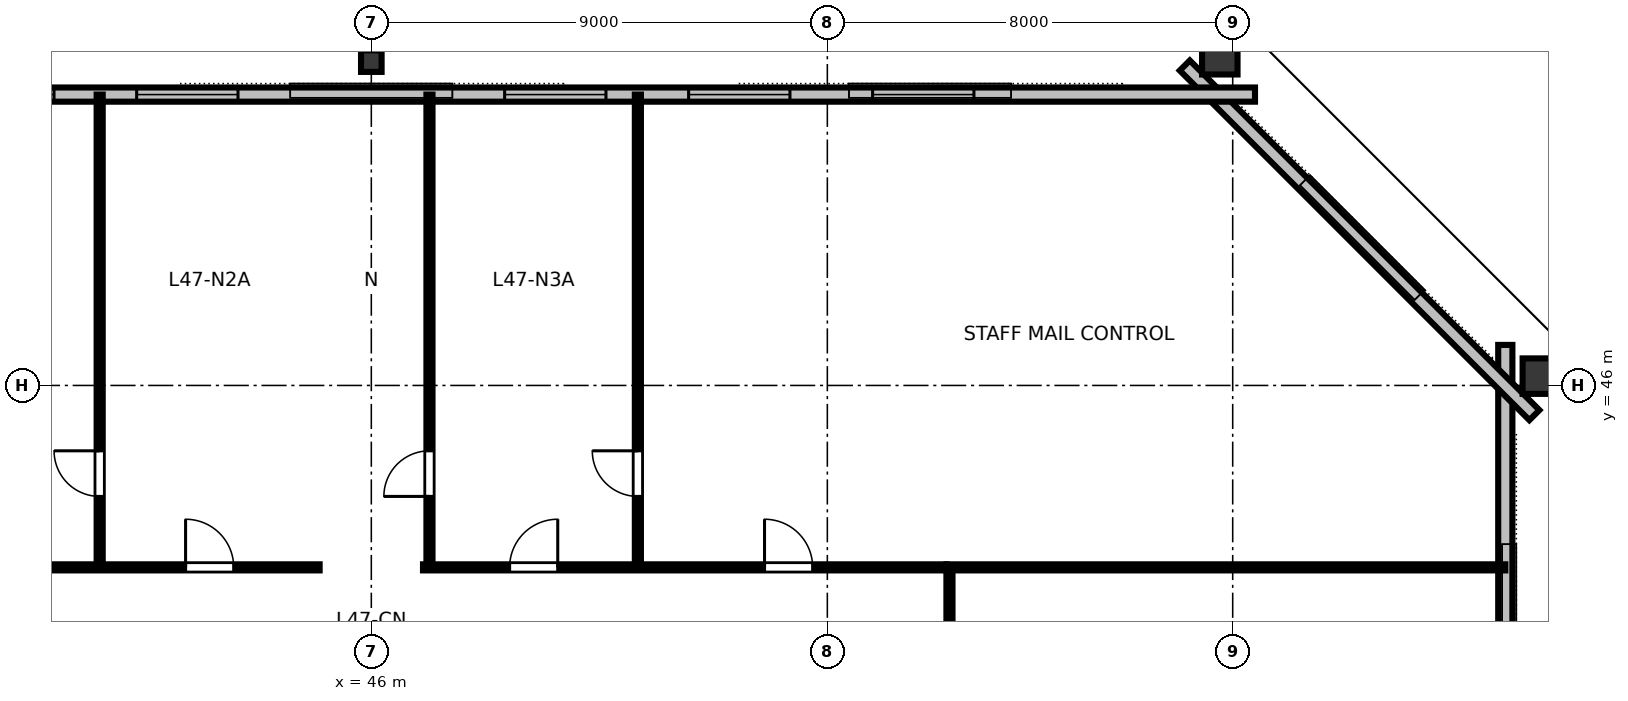
"""IFC4 building model, lengths in metres.
Left out: names, types, materials, properties, quantities, classifications, styles, units other than length and angle.
Written with IfcOpenShell. Run it as: python <this file> out.ifc"""

import sys

from ifc_helpers import new_model, si_unit, direction, frame, frame_2d, origin, origin_2d, place, context, subcontext, project, spatial, rectangle, hollow_rectangle, i_section, extrude, element, fill, save


model = new_model("IFC4")
c1 = context("Model", 3, precision=1e-05, world=origin(), true_north=direction((0.0, 1.0)))
c2 = subcontext(c1, "Body", "Model", "MODEL_VIEW")
j1 = project(units=[si_unit("LENGTHUNIT", "METRE"), si_unit("PLANEANGLEUNIT", "RADIAN")], contexts=[c1])
p1 = place(None, origin())
s1 = spatial("IfcSite", under=j1, at=p1, CompositionType="ELEMENT")
p2 = place(p1, origin())
s2 = spatial("IfcBuilding", under=s1, at=p2, CompositionType="ELEMENT")
p3 = place(p2, frame((0.0, 0.0, 180.6)))
s3 = spatial("IfcBuildingStorey", under=s2, at=p3, CompositionType="ELEMENT", Elevation=180.6)
for number, where, z_axis, x_axis in (
    (1, (69.146, 46.184, 0.0), (0.0, 0.0, 1.0), (0.0, 1.0, 0.0)),
    (2, (62.745, 52.562, 0.0), (0.0, 0.0, 1.0), (1.0, 0.0, 0.0)),
):
    element("IfcColumn", number, at=place(p3, frame(where, z_axis=z_axis, x_axis=x_axis)), inside=s3, PredefinedType="COLUMN", context=c2, shape_type="SweptSolid", body=[
        extrude(hollow_rectangle(XDim=0.7, YDim=0.85, WallThickness=0.04, at=origin_2d()), origin(), (0.0, 0.0, 1.0), 3.358),
    ])
p4 = place(p3, frame((46.0, 52.4, 0.0), z_axis=(0.0, 0.0, 1.0), x_axis=(1.0, 0.0, 0.0)))
e3 = element("IfcColumn", 3, at=p4, inside=s3, PredefinedType="COLUMN", context=c2, shape_type="SweptSolid", body=[
    extrude(i_section(OverallWidth=0.406, OverallDepth=0.425, WebThickness=0.033, FlangeThickness=0.052, FilletRadius=0.025, at=origin_2d()), origin(), (0.0, 0.0, 1.0), 3.358),
])
p5 = place(p3, frame((68.38, 17.2, 0.0), z_axis=(0.0, 0.0, 1.0), x_axis=(0.0, 1.0, 0.0)))
e4 = element("IfcWall", 4, at=p5, inside=s3, PredefinedType="STANDARD", context=c2, shape_type="SweptSolid", body=[
    extrude(rectangle(XDim=29.6, YDim=0.28, at=frame_2d((14.8, 0.0))), origin(), (0.0, 0.0, 1.0), 3.36),
])
p6 = place(p5, frame((5.971, 0.0, 0.8)))
e5 = element("IfcOpeningElement", 5, at=p6, cuts=e4, PredefinedType="OPENING", context=c2, shape_type="SweptSolid", body=[
    extrude(rectangle(XDim=2.0, YDim=1.95, at=frame_2d((1.0, 0.975))), frame((0.0, 0.15, 0.0), z_axis=(0.0, -1.0, 0.0), x_axis=(1.0, 0.0, 0.0)), (0.0, 0.0, 1.0), 0.3),
])
p7 = place(p5, frame((9.886, 0.0, 0.8)))
e6 = element("IfcOpeningElement", 6, at=p7, cuts=e4, PredefinedType="OPENING", context=c2, shape_type="SweptSolid", body=[
    extrude(rectangle(XDim=2.0, YDim=1.95, at=frame_2d((1.0, 0.975))), frame((0.0, 0.15, 0.0), z_axis=(0.0, -1.0, 0.0), x_axis=(1.0, 0.0, 0.0)), (0.0, 0.0, 1.0), 0.3),
])
p8 = place(p5, frame((17.714, 0.0, 0.8)))
e7 = element("IfcOpeningElement", 7, at=p8, cuts=e4, PredefinedType="OPENING", context=c2, shape_type="SweptSolid", body=[
    extrude(rectangle(XDim=2.0, YDim=1.95, at=frame_2d((1.0, 0.975))), frame((0.0, 0.15, 0.0), z_axis=(0.0, -1.0, 0.0), x_axis=(1.0, 0.0, 0.0)), (0.0, 0.0, 1.0), 0.3),
])
p9 = place(p5, frame((21.629, 0.0, 0.8)))
e8 = element("IfcOpeningElement", 8, at=p9, cuts=e4, PredefinedType="OPENING", context=c2, shape_type="SweptSolid", body=[
    extrude(rectangle(XDim=2.0, YDim=1.95, at=frame_2d((1.0, 0.975))), frame((0.0, 0.15, 0.0), z_axis=(0.0, -1.0, 0.0), x_axis=(1.0, 0.0, 0.0)), (0.0, 0.0, 1.0), 0.3),
])
p10 = place(p3, frame((68.954, 45.415, 0.0), z_axis=(0.0, 0.0, 1.0), x_axis=(-0.707106781187, 0.707106781187, 0.0)))
e9 = element("IfcWall", 9, at=p10, inside=s3, PredefinedType="STANDARD", context=c2, shape_type="SweptSolid", body=[
    extrude(rectangle(XDim=9.757, YDim=0.28, at=frame_2d((4.879, 0.0))), origin(), (0.0, 0.0, 1.0), 3.36),
])
p11 = place(p3, frame((63.44, 51.74, 0.0), z_axis=(0.0, 0.0, 1.0), x_axis=(-1.0, 0.0, 0.0)))
e10 = element("IfcWall", 10, at=p11, inside=s3, PredefinedType="STANDARD", context=c2, shape_type="SweptSolid", body=[
    extrude(rectangle(XDim=34.88, YDim=0.28, at=frame_2d((17.44, 0.0))), origin(), (0.0, 0.0, 1.0), 3.36),
])
p12 = place(p11, frame((5.547, 0.0, 0.8)))
e11 = element("IfcOpeningElement", 11, at=p12, cuts=e10, PredefinedType="OPENING", context=c2, shape_type="SweptSolid", body=[
    extrude(rectangle(XDim=2.0, YDim=1.95, at=frame_2d((1.0, 0.975))), frame((0.0, 0.15, 0.0), z_axis=(0.0, -1.0, 0.0), x_axis=(1.0, 0.0, 0.0)), (0.0, 0.0, 1.0), 0.3),
])
p13 = place(p11, frame((9.178, 0.0, 0.8)))
e12 = element("IfcOpeningElement", 12, at=p13, cuts=e10, PredefinedType="OPENING", context=c2, shape_type="SweptSolid", body=[
    extrude(rectangle(XDim=2.0, YDim=1.95, at=frame_2d((1.0, 0.975))), frame((0.0, 0.15, 0.0), z_axis=(0.0, -1.0, 0.0), x_axis=(1.0, 0.0, 0.0)), (0.0, 0.0, 1.0), 0.3),
])
p14 = place(p11, frame((12.809, 0.0, 0.8)))
e13 = element("IfcOpeningElement", 13, at=p14, cuts=e10, PredefinedType="OPENING", context=c2, shape_type="SweptSolid", body=[
    extrude(rectangle(XDim=2.0, YDim=1.95, at=frame_2d((1.0, 0.975))), frame((0.0, 0.15, 0.0), z_axis=(0.0, -1.0, 0.0), x_axis=(1.0, 0.0, 0.0)), (0.0, 0.0, 1.0), 0.3),
])
p15 = place(p11, frame((20.071, 0.0, 0.8)))
e14 = element("IfcOpeningElement", 14, at=p15, cuts=e10, PredefinedType="OPENING", context=c2, shape_type="SweptSolid", body=[
    extrude(rectangle(XDim=2.0, YDim=1.95, at=frame_2d((1.0, 0.975))), frame((0.0, 0.15, 0.0), z_axis=(0.0, -1.0, 0.0), x_axis=(1.0, 0.0, 0.0)), (0.0, 0.0, 1.0), 0.3),
])
p16 = place(p11, frame((23.702, 0.0, 0.8)))
e15 = element("IfcOpeningElement", 15, at=p16, cuts=e10, PredefinedType="OPENING", context=c2, shape_type="SweptSolid", body=[
    extrude(rectangle(XDim=2.0, YDim=1.95, at=frame_2d((1.0, 0.975))), frame((0.0, 0.15, 0.0), z_axis=(0.0, -1.0, 0.0), x_axis=(1.0, 0.0, 0.0)), (0.0, 0.0, 1.0), 0.3),
])
p17 = place(p11, frame((27.333, 0.0, 0.8)))
e16 = element("IfcOpeningElement", 16, at=p17, cuts=e10, PredefinedType="OPENING", context=c2, shape_type="SweptSolid", body=[
    extrude(rectangle(XDim=2.0, YDim=1.95, at=frame_2d((1.0, 0.975))), frame((0.0, 0.15, 0.0), z_axis=(0.0, -1.0, 0.0), x_axis=(1.0, 0.0, 0.0)), (0.0, 0.0, 1.0), 0.3),
])
p18 = place(p3, frame((40.639, 42.41, 0.0), z_axis=(0.0, 0.0, 1.0), x_axis=(0.0, 1.0, 0.0)))
e17 = element("IfcWall", 17, at=p18, inside=s3, PredefinedType="PARTITIONING", context=c2, shape_type="SweptSolid", body=[
    extrude(rectangle(XDim=9.33, YDim=0.12, at=frame_2d((4.665, 0.0))), origin(), (0.0, 0.0, 1.0), 2.64),
])
p19 = place(p18, frame((1.4, 0.0, 0.0)))
e18 = element("IfcOpeningElement", 18, at=p19, cuts=e17, PredefinedType="OPENING", context=c2, shape_type="SweptSolid", body=[
    extrude(rectangle(XDim=0.9, YDim=2.15, at=frame_2d((0.45, 1.075))), frame((0.0, 0.07, 0.0), z_axis=(0.0, -1.0, 0.0), x_axis=(1.0, 0.0, 0.0)), (0.0, 0.0, 1.0), 0.14),
])
p20 = place(p3, frame((47.148, 42.41, 0.0), z_axis=(0.0, 0.0, 1.0), x_axis=(0.0, 1.0, 0.0)))
e19 = element("IfcWall", 19, at=p20, inside=s3, PredefinedType="PARTITIONING", context=c2, shape_type="SweptSolid", body=[
    extrude(rectangle(XDim=9.33, YDim=0.12, at=frame_2d((4.665, 0.0))), origin(), (0.0, 0.0, 1.0), 2.64),
])
p21 = place(p20, frame((1.4, 0.0, 0.0)))
e20 = element("IfcOpeningElement", 20, at=p21, cuts=e19, PredefinedType="OPENING", context=c2, shape_type="SweptSolid", body=[
    extrude(rectangle(XDim=0.9, YDim=2.15, at=frame_2d((0.45, 1.075))), frame((0.0, 0.07, 0.0), z_axis=(0.0, -1.0, 0.0), x_axis=(1.0, 0.0, 0.0)), (0.0, 0.0, 1.0), 0.14),
])
p22 = place(p3, frame((51.261, 42.41, 0.0), z_axis=(0.0, 0.0, 1.0), x_axis=(0.0, 1.0, 0.0)))
e21 = element("IfcWall", 21, at=p22, inside=s3, PredefinedType="PARTITIONING", context=c2, shape_type="SweptSolid", body=[
    extrude(rectangle(XDim=9.33, YDim=0.12, at=frame_2d((4.665, 0.0))), origin(), (0.0, 0.0, 1.0), 2.64),
])
p23 = place(p22, frame((1.4, 0.0, 0.0)))
e22 = element("IfcOpeningElement", 22, at=p23, cuts=e21, PredefinedType="OPENING", context=c2, shape_type="SweptSolid", body=[
    extrude(rectangle(XDim=0.9, YDim=2.15, at=frame_2d((0.45, 1.075))), frame((0.0, 0.07, 0.0), z_axis=(0.0, -1.0, 0.0), x_axis=(1.0, 0.0, 0.0)), (0.0, 0.0, 1.0), 0.14),
])
p24 = place(p3, frame((34.65, 42.41, 0.0), z_axis=(0.0, 0.0, 1.0), x_axis=(1.0, 0.0, 0.0)))
e23 = element("IfcWall", 23, at=p24, inside=s3, PredefinedType="PARTITIONING", context=c2, shape_type="SweptSolid", body=[
    extrude(rectangle(XDim=10.33, YDim=0.12, at=frame_2d((5.165, 0.0))), origin(), (0.0, 0.0, 1.0), 2.64),
])
p25 = place(p24, frame((2.59, 0.0, 0.0)))
e24 = element("IfcOpeningElement", 24, at=p25, cuts=e23, PredefinedType="OPENING", context=c2, shape_type="SweptSolid", body=[
    extrude(rectangle(XDim=0.95, YDim=2.15, at=frame_2d((0.475, 1.075))), frame((0.0, 0.07, 0.0), z_axis=(0.0, -1.0, 0.0), x_axis=(1.0, 0.0, 0.0)), (0.0, 0.0, 1.0), 0.14),
])
p26 = place(p24, frame((7.685, 0.0, 0.0)))
e25 = element("IfcOpeningElement", 25, at=p26, cuts=e23, PredefinedType="OPENING", context=c2, shape_type="SweptSolid", body=[
    extrude(rectangle(XDim=0.95, YDim=2.15, at=frame_2d((0.475, 1.075))), frame((0.0, 0.07, 0.0), z_axis=(0.0, -1.0, 0.0), x_axis=(1.0, 0.0, 0.0)), (0.0, 0.0, 1.0), 0.14),
])
p27 = place(p3, frame((47.02, 42.41, 0.0), z_axis=(0.0, 0.0, 1.0), x_axis=(1.0, 0.0, 0.0)))
e26 = element("IfcWall", 26, at=p27, inside=s3, PredefinedType="PARTITIONING", context=c2, shape_type="SweptSolid", body=[
    extrude(rectangle(XDim=10.33, YDim=0.12, at=frame_2d((5.165, 0.0))), origin(), (0.0, 0.0, 1.0), 2.64),
])
p28 = place(p27, frame((1.709, 0.0, 0.0)))
e27 = element("IfcOpeningElement", 27, at=p28, cuts=e26, PredefinedType="OPENING", context=c2, shape_type="SweptSolid", body=[
    extrude(rectangle(XDim=0.95, YDim=2.15, at=frame_2d((0.475, 1.075))), frame((0.0, 0.07, 0.0), z_axis=(0.0, -1.0, 0.0), x_axis=(1.0, 0.0, 0.0)), (0.0, 0.0, 1.0), 0.14),
])
p29 = place(p27, frame((6.74, 0.0, 0.0)))
e28 = element("IfcOpeningElement", 28, at=p29, cuts=e26, PredefinedType="OPENING", context=c2, shape_type="SweptSolid", body=[
    extrude(rectangle(XDim=0.95, YDim=2.15, at=frame_2d((0.475, 1.075))), frame((0.0, 0.07, 0.0), z_axis=(0.0, -1.0, 0.0), x_axis=(1.0, 0.0, 0.0)), (0.0, 0.0, 1.0), 0.14),
])
p30 = place(p3, frame((57.41, 21.65, 0.0), z_axis=(0.0, 0.0, 1.0), x_axis=(0.0, 1.0, 0.0)))
e29 = element("IfcWall", 29, at=p30, inside=s3, PredefinedType="PARTITIONING", context=c2, shape_type="SweptSolid", body=[
    extrude(rectangle(XDim=20.7, YDim=0.12, at=frame_2d((10.35, 0.0))), origin(), (0.0, 0.0, 1.0), 2.64),
])
p31 = place(p30, frame((6.073, 0.0, 0.0)))
e30 = element("IfcOpeningElement", 30, at=p31, cuts=e29, PredefinedType="OPENING", context=c2, shape_type="SweptSolid", body=[
    extrude(rectangle(XDim=0.95, YDim=2.15, at=frame_2d((0.475, 1.075))), frame((0.0, 0.07, 0.0), z_axis=(0.0, -1.0, 0.0), x_axis=(1.0, 0.0, 0.0)), (0.0, 0.0, 1.0), 0.14),
])
p32 = place(p30, frame((16.223, 0.0, 0.0)))
e31 = element("IfcOpeningElement", 31, at=p32, cuts=e29, PredefinedType="OPENING", context=c2, shape_type="SweptSolid", body=[
    extrude(rectangle(XDim=0.95, YDim=2.15, at=frame_2d((0.475, 1.075))), frame((0.0, 0.07, 0.0), z_axis=(0.0, -1.0, 0.0), x_axis=(1.0, 0.0, 0.0)), (0.0, 0.0, 1.0), 0.14),
])
p33 = place(p3, frame((57.35, 42.41, 0.0), z_axis=(0.0, 0.0, 1.0), x_axis=(1.0, 0.0, 0.0)))
e32 = element("IfcWall", 32, at=p33, inside=s3, PredefinedType="PARTITIONING", context=c2, shape_type="SweptSolid", body=[
    extrude(rectangle(XDim=11.03, YDim=0.12, at=frame_2d((5.515, 0.0))), origin(), (0.0, 0.0, 1.0), 2.64),
])
p34 = place(p12, origin())
e33 = element("IfcWindow", 33, at=p34, inside=s3, PartitioningType="SINGLE_PANEL", PredefinedType="WINDOW", context=c2, shape_type="SweptSolid", body=[
    extrude(rectangle(XDim=2.0, YDim=1.95, at=frame_2d((1.0, 0.975))), frame((0.0, 0.03, 0.0), z_axis=(0.0, -1.0, 0.0), x_axis=(1.0, 0.0, 0.0)), (0.0, 0.0, 1.0), 0.06),
])
fill(e11, e33)
p35 = place(p13, origin())
e34 = element("IfcWindow", 34, at=p35, inside=s3, PartitioningType="SINGLE_PANEL", PredefinedType="WINDOW", context=c2, shape_type="SweptSolid", body=[
    extrude(rectangle(XDim=2.0, YDim=1.95, at=frame_2d((1.0, 0.975))), frame((0.0, 0.03, 0.0), z_axis=(0.0, -1.0, 0.0), x_axis=(1.0, 0.0, 0.0)), (0.0, 0.0, 1.0), 0.06),
])
fill(e12, e34)
p36 = place(p14, origin())
e35 = element("IfcWindow", 35, at=p36, inside=s3, PartitioningType="SINGLE_PANEL", PredefinedType="WINDOW", context=c2, shape_type="SweptSolid", body=[
    extrude(rectangle(XDim=2.0, YDim=1.95, at=frame_2d((1.0, 0.975))), frame((0.0, 0.03, 0.0), z_axis=(0.0, -1.0, 0.0), x_axis=(1.0, 0.0, 0.0)), (0.0, 0.0, 1.0), 0.06),
])
fill(e13, e35)
p37 = place(p15, origin())
e36 = element("IfcWindow", 36, at=p37, inside=s3, PartitioningType="SINGLE_PANEL", PredefinedType="WINDOW", context=c2, shape_type="SweptSolid", body=[
    extrude(rectangle(XDim=2.0, YDim=1.95, at=frame_2d((1.0, 0.975))), frame((0.0, 0.03, 0.0), z_axis=(0.0, -1.0, 0.0), x_axis=(1.0, 0.0, 0.0)), (0.0, 0.0, 1.0), 0.06),
])
fill(e14, e36)
p38 = place(p16, origin())
e37 = element("IfcWindow", 37, at=p38, inside=s3, PartitioningType="SINGLE_PANEL", PredefinedType="WINDOW", context=c2, shape_type="SweptSolid", body=[
    extrude(rectangle(XDim=2.0, YDim=1.95, at=frame_2d((1.0, 0.975))), frame((0.0, 0.03, 0.0), z_axis=(0.0, -1.0, 0.0), x_axis=(1.0, 0.0, 0.0)), (0.0, 0.0, 1.0), 0.06),
])
fill(e15, e37)
p39 = place(p19, origin())
e38 = element("IfcDoor", 38, at=p39, inside=s3, OperationType="SINGLE_SWING_RIGHT", PredefinedType="DOOR", context=c2, shape_type="SweptSolid", body=[
    extrude(rectangle(XDim=0.9, YDim=2.15, at=frame_2d((0.45, 1.075))), frame((0.0, 0.025, 0.0), z_axis=(0.0, -1.0, 0.0), x_axis=(1.0, 0.0, 0.0)), (0.0, 0.0, 1.0), 0.05),
])
fill(e18, e38)
p40 = place(p21, origin())
e39 = element("IfcDoor", 39, at=p40, inside=s3, OperationType="SINGLE_SWING_LEFT", PredefinedType="DOOR", context=c2, shape_type="SweptSolid", body=[
    extrude(rectangle(XDim=0.9, YDim=2.15, at=frame_2d((0.45, 1.075))), frame((0.0, 0.025, 0.0), z_axis=(0.0, -1.0, 0.0), x_axis=(1.0, 0.0, 0.0)), (0.0, 0.0, 1.0), 0.05),
])
fill(e20, e39)
p41 = place(p23, origin())
e40 = element("IfcDoor", 40, at=p41, inside=s3, OperationType="SINGLE_SWING_RIGHT", PredefinedType="DOOR", context=c2, shape_type="SweptSolid", body=[
    extrude(rectangle(XDim=0.9, YDim=2.15, at=frame_2d((0.45, 1.075))), frame((0.0, 0.025, 0.0), z_axis=(0.0, -1.0, 0.0), x_axis=(1.0, 0.0, 0.0)), (0.0, 0.0, 1.0), 0.05),
])
fill(e22, e40)
p42 = place(p26, origin())
e41 = element("IfcDoor", 41, at=p42, inside=s3, OperationType="SINGLE_SWING_LEFT", PredefinedType="DOOR", context=c2, shape_type="SweptSolid", body=[
    extrude(rectangle(XDim=0.95, YDim=2.15, at=frame_2d((0.475, 1.075))), frame((0.0, 0.025, 0.0), z_axis=(0.0, -1.0, 0.0), x_axis=(1.0, 0.0, 0.0)), (0.0, 0.0, 1.0), 0.05),
])
fill(e25, e41)
p43 = place(p28, origin())
e42 = element("IfcDoor", 42, at=p43, inside=s3, OperationType="SINGLE_SWING_RIGHT", PredefinedType="DOOR", context=c2, shape_type="SweptSolid", body=[
    extrude(rectangle(XDim=0.95, YDim=2.15, at=frame_2d((0.475, 1.075))), frame((0.0, 0.025, 0.0), z_axis=(0.0, -1.0, 0.0), x_axis=(1.0, 0.0, 0.0)), (0.0, 0.0, 1.0), 0.05),
])
fill(e27, e42)
p44 = place(p29, origin())
e43 = element("IfcDoor", 43, at=p44, inside=s3, OperationType="SINGLE_SWING_LEFT", PredefinedType="DOOR", context=c2, shape_type="SweptSolid", body=[
    extrude(rectangle(XDim=0.95, YDim=2.15, at=frame_2d((0.475, 1.075))), frame((0.0, 0.025, 0.0), z_axis=(0.0, -1.0, 0.0), x_axis=(1.0, 0.0, 0.0)), (0.0, 0.0, 1.0), 0.05),
])
fill(e28, e43)
save(model, sys.argv[1])
